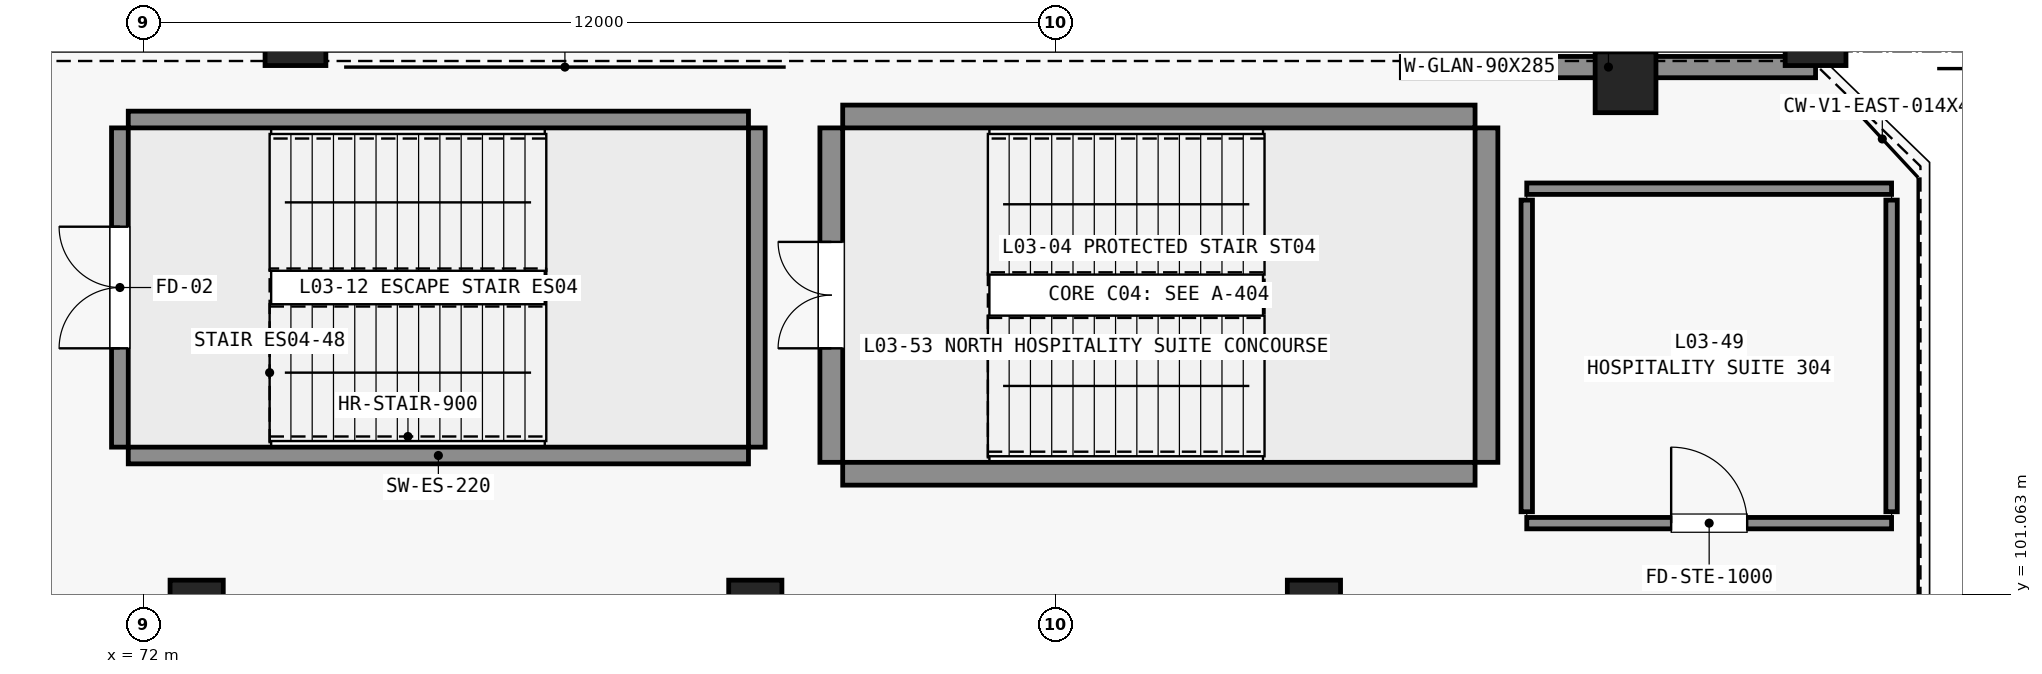
"""IFC4 building model, lengths in metres.
Left out: names, types, materials, properties, quantities, classifications, styles, units other than length and angle.
Written with IfcOpenShell. Run it as: python <this file> out.ifc"""

import sys

from ifc_helpers import new_model, si_unit, direction, frame, frame_2d, origin, origin_2d, place, context, subcontext, project, spatial, rectangle, extrude, element, fill, save


model = new_model("IFC4")
c1 = context("Model", 3, precision=1e-05, world=origin(), true_north=direction((0.0, 1.0)))
c2 = subcontext(c1, "Body", "Model", "MODEL_VIEW")
j1 = project(units=[si_unit("LENGTHUNIT", "METRE"), si_unit("PLANEANGLEUNIT", "RADIAN")], contexts=[c1])
p1 = place(None, origin())
s1 = spatial("IfcSite", under=j1, at=p1, CompositionType="ELEMENT")
p2 = place(p1, origin())
s2 = spatial("IfcBuilding", under=s1, at=p2, CompositionType="ELEMENT")
p3 = place(p2, frame((0.0, 0.0, 16.2)))
s3 = spatial("IfcBuildingStorey", under=s2, at=p3, CompositionType="ELEMENT", Elevation=16.2)
p4 = place(p3, frame((91.5, 107.8, 0.0), z_axis=(0.0, 0.0, 1.0), x_axis=(1.0, 0.0, 0.0)))
e1 = element("IfcColumn", 1, at=p4, inside=s3, PredefinedType="PILASTER", context=c2, shape_type="SweptSolid", body=[
    extrude(rectangle(XDim=0.8, YDim=0.8, at=origin_2d()), origin(), (0.0, 0.0, 1.0), 4.44),
])
for number, where, z_axis, x_axis in (
    (2, (74.0, 108.42, 0.0), (0.0, 0.0, 1.0), (1.0, 0.0, 0.0)),
    (3, (94.0, 108.42, 0.0), (0.0, 0.0, 1.0), (1.0, 0.0, 0.0)),
):
    element("IfcColumn", number, at=place(p3, frame(where, z_axis=z_axis, x_axis=x_axis)), inside=s3, PredefinedType="PILASTER", context=c2, shape_type="SweptSolid", body=[
        extrude(rectangle(XDim=0.8, YDim=0.8, at=origin_2d()), origin(), (0.0, 0.0, 1.0), 4.46),
    ])
for number, where, z_axis, x_axis in (
    (4, (81.2, 102.65, 0.0), (0.0, 0.0, 1.0), (1.0, 0.0, 0.0)),
    (5, (81.2, 107.35, 0.0), (0.0, 0.0, 1.0), (1.0, 0.0, 0.0)),
):
    element("IfcWall", number, at=place(p3, frame(where, z_axis=z_axis, x_axis=x_axis)), inside=s3, PredefinedType="SHEAR", context=c2, shape_type="SweptSolid", body=[
        extrude(rectangle(XDim=8.32, YDim=0.3, at=frame_2d((4.16, 0.0))), origin(), (0.0, 0.0, 1.0), 4.8),
    ])
p5 = place(p3, frame((81.05, 102.8, 0.0), z_axis=(0.0, 0.0, 1.0), x_axis=(0.0, 1.0, 0.0)))
e6 = element("IfcWall", 6, at=p5, inside=s3, PredefinedType="SHEAR", context=c2, shape_type="SweptSolid", body=[
    extrude(rectangle(XDim=4.4, YDim=0.3, at=frame_2d((2.2, 0.0))), origin(), (0.0, 0.0, 1.0), 4.8),
])
p6 = place(p5, frame((1.5, 0.0, 0.0)))
e7 = element("IfcOpeningElement", 7, at=p6, cuts=e6, PredefinedType="OPENING", context=c2, shape_type="SweptSolid", body=[
    extrude(rectangle(XDim=1.4, YDim=2.2, at=frame_2d((0.7, 1.1))), frame((0.0, 0.16, 0.0), z_axis=(0.0, -1.0, 0.0), x_axis=(1.0, 0.0, 0.0)), (0.0, 0.0, 1.0), 0.32),
])
p7 = place(p3, frame((89.67, 102.8, 0.0), z_axis=(0.0, 0.0, 1.0), x_axis=(0.0, 1.0, 0.0)))
e8 = element("IfcWall", 8, at=p7, inside=s3, PredefinedType="SHEAR", context=c2, shape_type="SweptSolid", body=[
    extrude(rectangle(XDim=4.4, YDim=0.3, at=frame_2d((2.2, 0.0))), origin(), (0.0, 0.0, 1.0), 4.8),
])
for number, where, z_axis, x_axis in (
    (9, (87.4, 100.9, 0.0), (0.0, 0.0, 1.0), (1.0, 0.0, 0.0)),
    (10, (80.05, 100.9, 0.0), (0.0, 0.0, 1.0), (1.0, 0.0, 0.0)),
    (11, (72.7, 100.9, 0.0), (0.0, 0.0, 1.0), (1.0, 0.0, 0.0)),
):
    element("IfcColumn", number, at=place(p3, frame(where, z_axis=z_axis, x_axis=x_axis)), inside=s3, PredefinedType="COLUMN", context=c2, shape_type="SweptSolid", body=[
        extrude(rectangle(XDim=0.7, YDim=0.7, at=origin_2d()), origin(), (0.0, 0.0, 1.0), 3.25),
    ])
p8 = place(p3, frame((88.55, 108.0, 0.0), z_axis=(0.0, 0.0, 1.0), x_axis=(1.0, 0.0, 0.0)))
e12 = element("IfcWall", 12, at=p8, inside=s3, PredefinedType="STANDARD", context=c2, shape_type="SweptSolid", body=[
    extrude(rectangle(XDim=5.45, YDim=0.28, at=frame_2d((2.725, 0.0))), origin(), (0.0, 0.0, 1.0), 4.44),
])
p9 = place(p8, frame((1.1, 0.0, 0.95)))
e13 = element("IfcOpeningElement", 13, at=p9, cuts=e12, PredefinedType="OPENING", context=c2, shape_type="SweptSolid", body=[
    extrude(rectangle(XDim=0.9, YDim=2.85, at=frame_2d((0.45, 1.425))), frame((0.0, 0.15, 0.0), z_axis=(0.0, -1.0, 0.0), x_axis=(1.0, 0.0, 0.0)), (0.0, 0.0, 1.0), 0.3),
])
for number, where, z_axis, x_axis in (
    (14, (71.8, 102.89, 0.0), (0.0, 0.0, 1.0), (1.0, 0.0, 0.0)),
    (15, (71.8, 107.31, 0.0), (0.0, 0.0, 1.0), (1.0, 0.0, 0.0)),
):
    element("IfcWall", number, at=place(p3, frame(where, z_axis=z_axis, x_axis=x_axis)), inside=s3, PredefinedType="SHEAR", context=c2, shape_type="SweptSolid", body=[
        extrude(rectangle(XDim=8.16, YDim=0.22, at=frame_2d((4.08, 0.0))), origin(), (0.0, 0.0, 1.0), 4.8),
    ])
p10 = place(p3, frame((71.69, 103.0, 0.0), z_axis=(0.0, 0.0, 1.0), x_axis=(0.0, 1.0, 0.0)))
e16 = element("IfcWall", 16, at=p10, inside=s3, PredefinedType="SHEAR", context=c2, shape_type="SweptSolid", body=[
    extrude(rectangle(XDim=4.2, YDim=0.22, at=frame_2d((2.1, 0.0))), origin(), (0.0, 0.0, 1.0), 4.8),
])
p11 = place(p10, frame((1.3, 0.0, 0.0)))
e17 = element("IfcOpeningElement", 17, at=p11, cuts=e16, PredefinedType="OPENING", context=c2, shape_type="SweptSolid", body=[
    extrude(rectangle(XDim=1.6, YDim=2.2, at=frame_2d((0.8, 1.1))), frame((0.0, 0.12, 0.0), z_axis=(0.0, -1.0, 0.0), x_axis=(1.0, 0.0, 0.0)), (0.0, 0.0, 1.0), 0.24),
])
p12 = place(p3, frame((80.07, 103.0, 0.0), z_axis=(0.0, 0.0, 1.0), x_axis=(0.0, 1.0, 0.0)))
e18 = element("IfcWall", 18, at=p12, inside=s3, PredefinedType="SHEAR", context=c2, shape_type="SweptSolid", body=[
    extrude(rectangle(XDim=4.2, YDim=0.22, at=frame_2d((2.1, 0.0))), origin(), (0.0, 0.0, 1.0), 4.8),
])
p13 = place(p3, frame((90.2, 102.0, 0.0), z_axis=(0.0, 0.0, 1.0), x_axis=(1.0, 0.0, 0.0)))
e19 = element("IfcWall", 19, at=p13, inside=s3, PredefinedType="STANDARD", context=c2, shape_type="SweptSolid", body=[
    extrude(rectangle(XDim=4.8, YDim=0.15, at=frame_2d((2.4, 0.0))), origin(), (0.0, 0.0, 1.0), 4.44),
])
p14 = place(p13, frame((1.9, 0.0, 0.0)))
e20 = element("IfcOpeningElement", 20, at=p14, cuts=e19, PredefinedType="OPENING", context=c2, shape_type="SweptSolid", body=[
    extrude(rectangle(XDim=1.0, YDim=2.15, at=frame_2d((0.5, 1.075))), frame((0.0, 0.085, 0.0), z_axis=(0.0, -1.0, 0.0), x_axis=(1.0, 0.0, 0.0)), (0.0, 0.0, 1.0), 0.17),
])
p15 = place(p3, frame((90.2, 106.4, 0.0), z_axis=(0.0, 0.0, 1.0), x_axis=(1.0, 0.0, 0.0)))
e21 = element("IfcWall", 21, at=p15, inside=s3, PredefinedType="STANDARD", context=c2, shape_type="SweptSolid", body=[
    extrude(rectangle(XDim=4.8, YDim=0.15, at=frame_2d((2.4, 0.0))), origin(), (0.0, 0.0, 1.0), 4.44),
])
for number, where, z_axis, x_axis in (
    (22, (90.2, 102.15, 0.0), (0.0, 0.0, 1.0), (0.0, 1.0, 0.0)),
    (23, (95.0, 102.15, 0.0), (0.0, 0.0, 1.0), (0.0, 1.0, 0.0)),
):
    element("IfcWall", number, at=place(p3, frame(where, z_axis=z_axis, x_axis=x_axis)), inside=s3, PredefinedType="STANDARD", context=c2, shape_type="SweptSolid", body=[
        extrude(rectangle(XDim=4.1, YDim=0.15, at=frame_2d((2.05, 0.0))), origin(), (0.0, 0.0, 1.0), 4.44),
    ])
p16 = place(p9, origin())
e24 = element("IfcWindow", 24, at=p16, inside=s3, PartitioningType="DOUBLE_PANEL_VERTICAL", PredefinedType="WINDOW", context=c2, shape_type="SweptSolid", body=[
    extrude(rectangle(XDim=0.9, YDim=2.85, at=frame_2d((0.45, 1.425))), frame((0.0, 0.03, 0.0), z_axis=(0.0, -1.0, 0.0), x_axis=(1.0, 0.0, 0.0)), (0.0, 0.0, 1.0), 0.06),
])
fill(e13, e24)
p17 = place(p6, origin())
e25 = element("IfcDoor", 25, at=p17, inside=s3, OperationType="DOUBLE_DOOR_SINGLE_SWING", PredefinedType="DOOR", context=c2, shape_type="SweptSolid", body=[
    extrude(rectangle(XDim=1.4, YDim=2.2, at=frame_2d((0.7, 1.1))), frame((0.0, 0.025, 0.0), z_axis=(0.0, -1.0, 0.0), x_axis=(1.0, 0.0, 0.0)), (0.0, 0.0, 1.0), 0.05),
])
fill(e7, e25)
p18 = place(p11, origin())
e26 = element("IfcDoor", 26, at=p18, inside=s3, OperationType="DOUBLE_DOOR_SINGLE_SWING", PredefinedType="DOOR", context=c2, shape_type="SweptSolid", body=[
    extrude(rectangle(XDim=1.6, YDim=2.2, at=frame_2d((0.8, 1.1))), frame((0.0, 0.025, 0.0), z_axis=(0.0, -1.0, 0.0), x_axis=(1.0, 0.0, 0.0)), (0.0, 0.0, 1.0), 0.05),
])
fill(e17, e26)
p19 = place(p14, origin())
e27 = element("IfcDoor", 27, at=p19, inside=s3, OperationType="SINGLE_SWING_LEFT", PredefinedType="DOOR", context=c2, shape_type="SweptSolid", body=[
    extrude(rectangle(XDim=1.0, YDim=2.15, at=frame_2d((0.5, 1.075))), frame((0.0, 0.025, 0.0), z_axis=(0.0, -1.0, 0.0), x_axis=(1.0, 0.0, 0.0)), (0.0, 0.0, 1.0), 0.05),
])
fill(e20, e27)
save(model, sys.argv[1])
